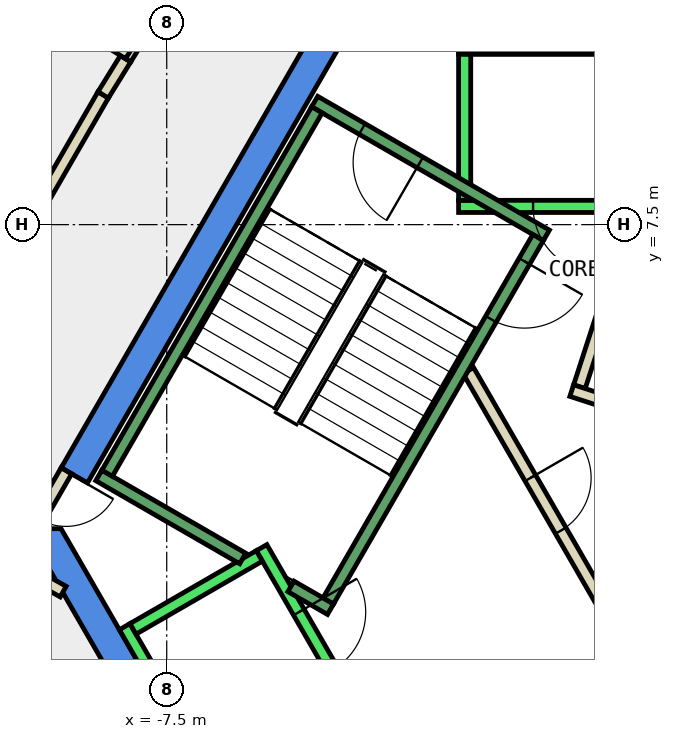
"""IFC4 building model, lengths in metres.
Left out: names, types, materials, properties, quantities, classifications, styles, units other than length and angle.
Written with IfcOpenShell. Run it as: python <this file> out.ifc"""

import sys

from ifc_helpers import new_model, si_unit, direction, frame, frame_2d, origin, place, context, subcontext, project, spatial, polyline, rectangle, outline, extrude, element, fill, save


model = new_model("IFC4")
c1 = context("Model", 3, precision=1e-05, world=origin(), true_north=direction((0.0, 1.0)))
c2 = subcontext(c1, "Body", "Model", "MODEL_VIEW")
j1 = project(units=[si_unit("LENGTHUNIT", "METRE"), si_unit("PLANEANGLEUNIT", "RADIAN")], contexts=[c1])
p1 = place(None, origin())
s1 = spatial("IfcSite", under=j1, at=p1, CompositionType="ELEMENT")
p2 = place(p1, origin())
s2 = spatial("IfcBuilding", under=s1, at=p2, CompositionType="ELEMENT")
p3 = place(p2, frame((0.0, 0.0, 300.8)))
s3 = spatial("IfcBuildingStorey", under=s2, at=p3, CompositionType="ELEMENT", Elevation=300.8)
p4 = place(p3, frame((0.0, 0.0, -0.34)))
e1 = element("IfcWall", 1, at=p4, inside=s3, PredefinedType="SHEAR", context=c2, shape_type="SweptSolid", body=[
    extrude(outline(polyline([(-9.236, 3.502), (-8.803, 3.253), (-4.619, 10.5), (-4.907, 11.0), (-9.236, 3.502)])), origin(), (0.0, 0.0, 1.0), 3.6),
])
p5 = place(p3, frame((0.0, 0.0, -0.34)))
e2 = element("IfcWall", 2, at=p5, inside=s3, PredefinedType="SHEAR", context=c2, shape_type="SweptSolid", body=[
    extrude(outline(polyline([(-9.815, 2.5), (-4.907, -6.0), (-4.619, -5.5), (-9.238, 2.5), (-9.815, 2.5)])), origin(), (0.0, 0.0, 1.0), 3.6),
])
p6 = place(p3, frame((-0.157, 6.547, 0.0), z_axis=(0.0, 0.0, 1.0), x_axis=(-0.308813127339, -0.951122732555, 0.0)))
e3 = element("IfcWall", 3, at=p6, inside=s3, PredefinedType="PARTITIONING", context=c2, shape_type="SweptSolid", body=[
    extrude(rectangle(XDim=1.8, YDim=0.2, at=frame_2d((0.9, 0.0))), origin(), (0.0, 0.0, 1.0), 3.26),
])
p7 = place(p3, frame((-0.839, 4.771, 0.0), z_axis=(0.0, 0.0, 1.0), x_axis=(0.950961084355, -0.309310549515, 0.0)))
e4 = element("IfcWall", 4, at=p7, inside=s3, PredefinedType="PARTITIONING", context=c2, shape_type="SweptSolid", body=[
    extrude(rectangle(XDim=3.0, YDim=0.2, at=frame_2d((1.5, 0.0))), origin(), (0.0, 0.0, 1.0), 3.26),
])
p8 = place(p7, frame((1.05, 0.0, 0.0)))
e5 = element("IfcOpeningElement", 5, at=p8, cuts=e4, PredefinedType="OPENING", context=c2, shape_type="SweptSolid", body=[
    extrude(rectangle(XDim=0.9, YDim=2.1, at=frame_2d((0.45, 1.05))), frame((0.0, 0.11, 0.0), z_axis=(0.0, -1.0, 0.0), x_axis=(1.0, 0.0, 0.0)), (0.0, 0.0, 1.0), 0.22),
])
p9 = place(p3, frame((-9.203, 1.465, 0.0), z_axis=(0.0, 0.0, 1.0), x_axis=(-0.872243753731, 0.489071399775, 0.0)))
e6 = element("IfcWall", 6, at=p9, inside=s3, PredefinedType="PARTITIONING", context=c2, shape_type="SweptSolid", body=[
    extrude(rectangle(XDim=1.715, YDim=0.2, at=frame_2d((0.858, 0.0))), origin(), (0.0, 0.0, 1.0), 3.26),
])
p10 = place(p3, frame((-10.543, 6.174, 0.0), z_axis=(0.0, 0.0, 1.0), x_axis=(0.50008212199, 0.86597798544, 0.0)))
e7 = element("IfcWall", 7, at=p10, inside=s3, PredefinedType="PARTITIONING", context=c2, shape_type="SweptSolid", body=[
    extrude(rectangle(XDim=3.995, YDim=0.2, at=frame_2d((1.998, 0.0))), origin(), (0.0, 0.0, 1.0), 3.26),
])
p11 = place(p3, frame((-8.545, 9.634, 0.0), z_axis=(0.0, 0.0, 1.0), x_axis=(0.52594604986, 0.85051793199, 0.0)))
e8 = element("IfcWall", 8, at=p11, inside=s3, PredefinedType="PARTITIONING", context=c2, shape_type="SweptSolid", body=[
    extrude(rectangle(XDim=0.699, YDim=0.2, at=frame_2d((0.35, 0.0))), origin(), (0.0, 0.0, 1.0), 3.26),
])
p12 = place(p3, frame((-8.177, 10.229, 0.0), z_axis=(0.0, 0.0, 1.0), x_axis=(0.526504295939, 0.850172468595, 0.0)))
e9 = element("IfcWall", 9, at=p12, inside=s3, PredefinedType="PARTITIONING", context=c2, shape_type="SweptSolid", body=[
    extrude(rectangle(XDim=3.2, YDim=0.2, at=frame_2d((1.6, 0.0))), origin(), (0.0, 0.0, 1.0), 3.26),
])
p13 = place(p3, frame((-0.982, -1.0, 0.0), z_axis=(0.0, 0.0, 1.0), x_axis=(0.50024047865, 0.865886518847, 0.0)))
e10 = element("IfcWall", 10, at=p13, inside=s3, PredefinedType="PARTITIONING", context=c2, shape_type="SweptSolid", body=[
    extrude(rectangle(XDim=1.863, YDim=0.2, at=frame_2d((0.931, 0.0))), origin(), (0.0, 0.0, 1.0), 3.26),
])
p14 = place(p3, frame((-2.54, 5.1, 0.0), z_axis=(0.0, 0.0, 1.0), x_axis=(0.499925051871, -0.866068670783, 0.0)))
e11 = element("IfcWall", 11, at=p14, inside=s3, PredefinedType="PARTITIONING", context=c2, shape_type="SweptSolid", body=[
    extrude(rectangle(XDim=5.181, YDim=0.2, at=frame_2d((2.59, 0.0))), origin(), (0.0, 0.0, 1.0), 3.26),
])
p15 = place(p14, frame((2.04, 0.0, 0.0)))
e12 = element("IfcOpeningElement", 12, at=p15, cuts=e11, PredefinedType="OPENING", context=c2, shape_type="SweptSolid", body=[
    extrude(rectangle(XDim=1.0, YDim=2.1, at=frame_2d((0.5, 1.05))), frame((0.0, 0.11, 0.0), z_axis=(0.0, -1.0, 0.0), x_axis=(1.0, 0.0, 0.0)), (0.0, 0.0, 1.0), 0.22),
])
p16 = place(p3, frame((-10.42, 11.736, 0.0), z_axis=(0.0, 0.0, 1.0), x_axis=(0.850124477172, -0.52658178217, 0.0)))
e13 = element("IfcWall", 13, at=p16, inside=s3, PredefinedType="PARTITIONING", context=c2, shape_type="SweptSolid", body=[
    extrude(rectangle(XDim=2.701, YDim=0.2, at=frame_2d((1.35, 0.0))), origin(), (0.0, 0.0, 1.0), 3.26),
])
p17 = place(p3, frame((-9.15, 3.452, 0.0), z_axis=(0.0, 0.0, 1.0), x_axis=(-0.500079945886, -0.865979242085, 0.0)))
e14 = element("IfcWall", 14, at=p17, inside=s3, PredefinedType="PARTITIONING", context=c2, shape_type="SweptSolid", body=[
    extrude(rectangle(XDim=0.926, YDim=0.2, at=frame_2d((0.463, 0.0))), origin(), (0.0, 0.0, 1.0), 2.4),
])
p18 = place(p17, frame((0.017, 0.0, 0.0)))
e15 = element("IfcOpeningElement", 15, at=p18, cuts=e14, PredefinedType="OPENING", context=c2, shape_type="SweptSolid", body=[
    extrude(rectangle(XDim=0.9, YDim=2.1, at=frame_2d((0.45, 1.05))), frame((0.0, 0.11, 0.0), z_axis=(0.0, -1.0, 0.0), x_axis=(1.0, 0.0, 0.0)), (0.0, 0.0, 1.0), 0.22),
])
p19 = place(p3, frame((2.7, 7.8, 0.0), z_axis=(0.0, 0.0, 1.0), x_axis=(-1.0, 0.0, 0.0)))
e16 = element("IfcWall", 16, at=p19, inside=s3, PredefinedType="STANDARD", context=c2, shape_type="SweptSolid", body=[
    extrude(rectangle(XDim=5.4, YDim=0.2, at=frame_2d((2.7, 0.0))), origin(), (0.0, 0.0, 1.0), 3.26),
])
p20 = place(p19, frame((1.225, 0.0, 0.0)))
e17 = element("IfcOpeningElement", 17, at=p20, cuts=e16, PredefinedType="OPENING", context=c2, shape_type="SweptSolid", body=[
    extrude(rectangle(XDim=1.1, YDim=2.1, at=frame_2d((0.55, 1.05))), frame((0.0, 0.11, 0.0), z_axis=(0.0, -1.0, 0.0), x_axis=(1.0, 0.0, 0.0)), (0.0, 0.0, 1.0), 0.22),
])
p21 = place(p19, frame((3.075, 0.0, 0.0)))
e18 = element("IfcOpeningElement", 18, at=p21, cuts=e16, PredefinedType="OPENING", context=c2, shape_type="SweptSolid", body=[
    extrude(rectangle(XDim=1.1, YDim=2.1, at=frame_2d((0.55, 1.05))), frame((0.0, 0.11, 0.0), z_axis=(0.0, -1.0, 0.0), x_axis=(1.0, 0.0, 0.0)), (0.0, 0.0, 1.0), 0.22),
])
p22 = place(p3, frame((2.7, 10.4, 0.0), z_axis=(0.0, 0.0, 1.0), x_axis=(-1.0, 0.0, 0.0)))
e19 = element("IfcWall", 19, at=p22, inside=s3, PredefinedType="STANDARD", context=c2, shape_type="SweptSolid", body=[
    extrude(rectangle(XDim=5.4, YDim=0.2, at=frame_2d((2.7, 0.0))), origin(), (0.0, 0.0, 1.0), 3.26),
])
p23 = place(p3, frame((-2.6, 7.9, 0.0), z_axis=(0.0, 0.0, 1.0), x_axis=(0.0, 1.0, 0.0)))
e20 = element("IfcWall", 20, at=p23, inside=s3, PredefinedType="STANDARD", context=c2, shape_type="SweptSolid", body=[
    extrude(rectangle(XDim=2.4, YDim=0.2, at=frame_2d((1.2, 0.0))), origin(), (0.0, 0.0, 1.0), 3.26),
])
p24 = place(p3, frame((-5.94, 2.188, 0.0), z_axis=(0.0, 0.0, 1.0), x_axis=(0.500034260056, -0.866005622828, 0.0)))
e21 = element("IfcWall", 21, at=p24, inside=s3, PredefinedType="STANDARD", context=c2, shape_type="SweptSolid", body=[
    extrude(rectangle(XDim=5.399, YDim=0.2, at=frame_2d((2.7, 0.0))), origin(), (0.0, 0.0, 1.0), 3.26),
])
p25 = place(p24, frame((3.075, 0.0, 0.0)))
e22 = element("IfcOpeningElement", 22, at=p25, cuts=e21, PredefinedType="OPENING", context=c2, shape_type="SweptSolid", body=[
    extrude(rectangle(XDim=1.1, YDim=2.1, at=frame_2d((0.55, 1.05))), frame((0.0, 0.11, 0.0), z_axis=(0.0, -1.0, 0.0), x_axis=(1.0, 0.0, 0.0)), (0.0, 0.0, 1.0), 0.22),
])
p26 = place(p24, frame((1.225, 0.0, 0.0)))
e23 = element("IfcOpeningElement", 23, at=p26, cuts=e21, PredefinedType="OPENING", context=c2, shape_type="SweptSolid", body=[
    extrude(rectangle(XDim=1.1, YDim=2.1, at=frame_2d((0.55, 1.05))), frame((0.0, 0.11, 0.0), z_axis=(0.0, -1.0, 0.0), x_axis=(1.0, 0.0, 0.0)), (0.0, 0.0, 1.0), 0.22),
])
p27 = place(p3, frame((-8.192, 0.888, 0.0), z_axis=(0.0, 0.0, 1.0), x_axis=(0.500034260056, -0.866005622828, 0.0)))
e24 = element("IfcWall", 24, at=p27, inside=s3, PredefinedType="STANDARD", context=c2, shape_type="SweptSolid", body=[
    extrude(rectangle(XDim=5.399, YDim=0.2, at=frame_2d((2.7, 0.0))), origin(), (0.0, 0.0, 1.0), 3.26),
])
p28 = place(p3, frame((-5.977, 2.052, 0.0), z_axis=(0.0, 0.0, 1.0), x_axis=(-0.865973769406, -0.500089422704, 0.0)))
e25 = element("IfcWall", 25, at=p28, inside=s3, PredefinedType="STANDARD", context=c2, shape_type="SweptSolid", body=[
    extrude(rectangle(XDim=2.399, YDim=0.2, at=frame_2d((1.2, 0.0))), origin(), (0.0, 0.0, 1.0), 3.26),
])
p29 = place(p3, frame((-1.256, 7.324, 0.0), z_axis=(0.0, 0.0, 1.0), x_axis=(-0.866046073146, 0.499964197906, 0.0)))
e26 = element("IfcWall", 26, at=p29, inside=s3, PredefinedType="STANDARD", context=c2, shape_type="SweptSolid", body=[
    extrude(rectangle(XDim=4.4, YDim=0.2, at=frame_2d((2.2, 0.0))), origin(), (0.0, 0.0, 1.0), 3.26),
])
p30 = place(p29, frame((2.4, 0.0, 0.0)))
e27 = element("IfcOpeningElement", 27, at=p30, cuts=e26, PredefinedType="OPENING", context=c2, shape_type="SweptSolid", body=[
    extrude(rectangle(XDim=1.1, YDim=2.2, at=frame_2d((0.55, 1.1))), frame((0.0, 0.11, 0.0), z_axis=(0.0, -1.0, 0.0), x_axis=(1.0, 0.0, 0.0)), (0.0, 0.0, 1.0), 0.22),
])
p31 = place(p3, frame((-6.25, 2.01, 0.0), z_axis=(0.0, 0.0, 1.0), x_axis=(-0.86611865017, 0.499838457731, 0.0)))
e28 = element("IfcWall", 28, at=p31, inside=s3, PredefinedType="STANDARD", context=c2, shape_type="SweptSolid", body=[
    extrude(rectangle(XDim=2.733, YDim=0.2, at=frame_2d((1.366, 0.0))), origin(), (0.0, 0.0, 1.0), 3.26),
])
p32 = place(p3, frame((-4.806, 1.176, 0.0), z_axis=(0.0, 0.0, 1.0), x_axis=(-0.866558586415, 0.499075361355, 0.0)))
e29 = element("IfcWall", 29, at=p32, inside=s3, PredefinedType="STANDARD", context=c2, shape_type="SweptSolid", body=[
    extrude(rectangle(XDim=0.751, YDim=0.2, at=frame_2d((0.376, 0.0))), origin(), (0.0, 0.0, 1.0), 3.26),
])
p33 = place(p3, frame((-1.393, 7.288, 0.0), z_axis=(0.0, 0.0, 1.0), x_axis=(-0.499963383562, -0.866046543262, 0.0)))
e30 = element("IfcWall", 30, at=p33, inside=s3, PredefinedType="STANDARD", context=c2, shape_type="SweptSolid", body=[
    extrude(rectangle(XDim=6.9, YDim=0.2, at=frame_2d((3.45, 0.0))), origin(), (0.0, 0.0, 1.0), 3.26),
])
p34 = place(p33, frame((0.45, 0.0, 0.0)))
e31 = element("IfcOpeningElement", 31, at=p34, cuts=e30, PredefinedType="OPENING", context=c2, shape_type="SweptSolid", body=[
    extrude(rectangle(XDim=1.1, YDim=2.2, at=frame_2d((0.55, 1.1))), frame((0.0, 0.11, 0.0), z_axis=(0.0, -1.0, 0.0), x_axis=(1.0, 0.0, 0.0)), (0.0, 0.0, 1.0), 0.22),
])
p35 = place(p3, frame((-5.03, 9.388, 0.0), z_axis=(0.0, 0.0, 1.0), x_axis=(-0.499978703459, -0.866037698999, 0.0)))
e32 = element("IfcWall", 32, at=p35, inside=s3, PredefinedType="STANDARD", context=c2, shape_type="SweptSolid", body=[
    extrude(rectangle(XDim=6.9, YDim=0.2, at=frame_2d((3.45, 0.0))), origin(), (0.0, 0.0, 1.0), 3.26),
])
p36 = place(p15, origin())
e33 = element("IfcDoor", 33, at=p36, inside=s3, OperationType="SINGLE_SWING_RIGHT", PredefinedType="DOOR", context=c2, shape_type="SweptSolid", body=[
    extrude(rectangle(XDim=1.0, YDim=2.1, at=frame_2d((0.5, 1.05))), frame((0.0, 0.025, 0.0), z_axis=(0.0, -1.0, 0.0), x_axis=(1.0, 0.0, 0.0)), (0.0, 0.0, 1.0), 0.05),
])
fill(e12, e33)
p37 = place(p18, origin())
e34 = element("IfcDoor", 34, at=p37, inside=s3, OperationType="SINGLE_SWING_LEFT", PredefinedType="DOOR", context=c2, shape_type="SweptSolid", body=[
    extrude(rectangle(XDim=0.9, YDim=2.1, at=frame_2d((0.45, 1.05))), frame((0.0, 0.025, 0.0), z_axis=(0.0, -1.0, 0.0), x_axis=(1.0, 0.0, 0.0)), (0.0, 0.0, 1.0), 0.05),
])
fill(e15, e34)
p38 = place(p21, origin())
e35 = element("IfcDoor", 35, at=p38, inside=s3, OperationType="SLIDING_TO_LEFT", PredefinedType="DOOR", context=c2, shape_type="SweptSolid", body=[
    extrude(rectangle(XDim=1.1, YDim=2.1, at=frame_2d((0.55, 1.05))), frame((0.0, 0.025, 0.0), z_axis=(0.0, -1.0, 0.0), x_axis=(1.0, 0.0, 0.0)), (0.0, 0.0, 1.0), 0.05),
])
fill(e18, e35)
p39 = place(p26, origin())
e36 = element("IfcDoor", 36, at=p39, inside=s3, OperationType="SLIDING_TO_LEFT", PredefinedType="DOOR", context=c2, shape_type="SweptSolid", body=[
    extrude(rectangle(XDim=1.1, YDim=2.1, at=frame_2d((0.55, 1.05))), frame((0.0, 0.025, 0.0), z_axis=(0.0, -1.0, 0.0), x_axis=(1.0, 0.0, 0.0)), (0.0, 0.0, 1.0), 0.05),
])
fill(e23, e36)
p40 = place(p34, origin())
e37 = element("IfcDoor", 37, at=p40, inside=s3, OperationType="SINGLE_SWING_LEFT", PredefinedType="DOOR", context=c2, shape_type="SweptSolid", body=[
    extrude(rectangle(XDim=1.1, YDim=2.2, at=frame_2d((0.55, 1.1))), frame((0.0, 0.025, 0.0), z_axis=(0.0, -1.0, 0.0), x_axis=(1.0, 0.0, 0.0)), (0.0, 0.0, 1.0), 0.05),
])
fill(e31, e37)
p41 = place(p30, origin())
e38 = element("IfcDoor", 38, at=p41, inside=s3, OperationType="SINGLE_SWING_LEFT", PredefinedType="DOOR", context=c2, shape_type="SweptSolid", body=[
    extrude(rectangle(XDim=1.1, YDim=2.2, at=frame_2d((0.55, 1.1))), frame((0.0, 0.025, 0.0), z_axis=(0.0, -1.0, 0.0), x_axis=(1.0, 0.0, 0.0)), (0.0, 0.0, 1.0), 0.05),
])
fill(e27, e38)
save(model, sys.argv[1])
